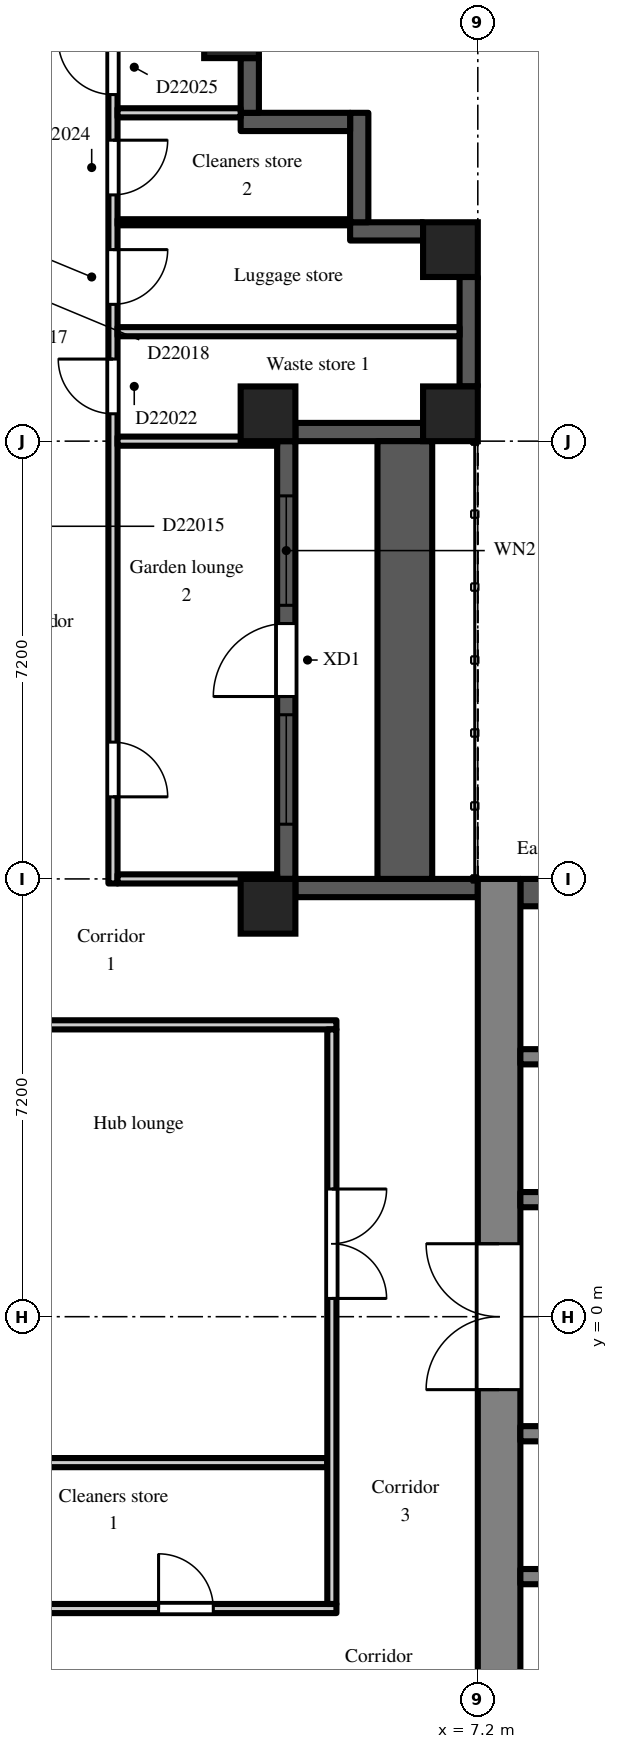
"""IFC4 building model, lengths in metres.
Left out: names, types, materials, properties, quantities, classifications, styles, units other than length and angle.
Written with IfcOpenShell. Run it as: python <this file> out.ifc"""

import sys

from ifc_helpers import new_model, si_unit, direction, frame, frame_2d, origin, origin_2d, place, context, subcontext, project, spatial, rectangle, extrude, element, fill, save


model = new_model("IFC4")
c1 = context("Model", 3, precision=1e-05, world=origin(), true_north=direction((0.0, 1.0)))
c2 = subcontext(c1, "Body", "Model", "MODEL_VIEW")
j1 = project(units=[si_unit("LENGTHUNIT", "METRE"), si_unit("PLANEANGLEUNIT", "RADIAN")], contexts=[c1])
p1 = place(None, origin())
s1 = spatial("IfcSite", under=j1, at=p1, CompositionType="ELEMENT")
p2 = place(p1, origin())
s2 = spatial("IfcBuilding", under=s1, at=p2, CompositionType="ELEMENT")
p3 = place(p2, frame((0.0, 0.0, 159.3)))
s3 = spatial("IfcBuildingStorey", under=s2, at=p3, CompositionType="ELEMENT", Elevation=159.3)
for number, where, z_axis, x_axis in (
    (1, (3.15, 21.15, 0.0), (0.0, 0.0, 1.0), (1.0, 0.0, 0.0)),
    (2, (3.75, 6.75, 0.0), (0.0, 0.0, 1.0), (1.0, 0.0, 0.0)),
    (3, (3.75, 14.85, 0.0), (0.0, 0.0, 1.0), (1.0, 0.0, 0.0)),
    (4, (6.75, 14.85, 0.0), (0.0, 0.0, 1.0), (1.0, 0.0, 0.0)),
    (5, (6.75, 17.55, 0.0), (0.0, 0.0, 1.0), (1.0, 0.0, 0.0)),
):
    element("IfcColumn", number, at=place(p3, frame(where, z_axis=z_axis, x_axis=x_axis)), inside=s3, PredefinedType="COLUMN", context=c2, shape_type="SweptSolid", body=[
        extrude(rectangle(XDim=0.9, YDim=0.9, at=origin_2d()), origin(), (0.0, 0.0, 1.0), 3.0),
    ])
p4 = place(p3, frame((7.2, 7.05, 0.0), z_axis=(0.0, 0.0, 1.0), x_axis=(-1.0, 0.0, 0.0)))
e6 = element("IfcWall", 6, at=p4, inside=s3, PredefinedType="SOLIDWALL", context=c2, shape_type="SweptSolid", body=[
    extrude(rectangle(XDim=3.0, YDim=0.3, at=frame_2d((1.5, 0.0))), origin(), (0.0, 0.0, 1.0), 2.55),
])
p5 = place(p3, frame((4.05, 7.2, 0.0), z_axis=(0.0, 0.0, 1.0), x_axis=(0.0, 1.0, 0.0)))
e7 = element("IfcWall", 7, at=p5, inside=s3, PredefinedType="SOLIDWALL", context=c2, shape_type="SweptSolid", body=[
    extrude(rectangle(XDim=7.2, YDim=0.3, at=frame_2d((3.6, 0.0))), origin(), (0.0, 0.0, 1.0), 2.55),
])
p6 = place(p5, frame((3.0, 0.0, 0.0)))
e8 = element("IfcOpeningElement", 8, at=p6, cuts=e7, PredefinedType="OPENING", context=c2, shape_type="SweptSolid", body=[
    extrude(rectangle(XDim=1.2, YDim=2.05, at=frame_2d((0.6, 1.025))), frame((0.0, 0.16, 0.0), z_axis=(0.0, -1.0, 0.0), x_axis=(1.0, 0.0, 0.0)), (0.0, 0.0, 1.0), 0.32),
])
p7 = place(p5, frame((0.9, 0.0, 0.2)))
e9 = element("IfcOpeningElement", 9, at=p7, cuts=e7, PredefinedType="OPENING", context=c2, shape_type="SweptSolid", body=[
    extrude(rectangle(XDim=1.8, YDim=1.85, at=frame_2d((0.9, 0.925))), frame((0.0, 0.16, 0.0), z_axis=(0.0, -1.0, 0.0), x_axis=(1.0, 0.0, 0.0)), (0.0, 0.0, 1.0), 0.32),
])
p8 = place(p5, frame((4.5, 0.0, 0.2)))
e10 = element("IfcOpeningElement", 10, at=p8, cuts=e7, PredefinedType="OPENING", context=c2, shape_type="SweptSolid", body=[
    extrude(rectangle(XDim=1.8, YDim=1.85, at=frame_2d((0.9, 0.925))), frame((0.0, 0.16, 0.0), z_axis=(0.0, -1.0, 0.0), x_axis=(1.0, 0.0, 0.0)), (0.0, 0.0, 1.0), 0.32),
])
p9 = place(p3, frame((4.2, 14.55, 0.0), z_axis=(0.0, 0.0, 1.0), x_axis=(1.0, 0.0, 0.0)))
e11 = element("IfcWall", 11, at=p9, inside=s3, PredefinedType="SOLIDWALL", context=c2, shape_type="SweptSolid", body=[
    extrude(rectangle(XDim=2.1, YDim=0.3, at=frame_2d((1.05, 0.0))), origin(), (0.0, 0.0, 1.0), 2.55),
])
p10 = place(p3, frame((7.05, 15.3, 0.0), z_axis=(0.0, 0.0, 1.0), x_axis=(0.0, 1.0, 0.0)))
e12 = element("IfcWall", 12, at=p10, inside=s3, PredefinedType="SOLIDWALL", context=c2, shape_type="SweptSolid", body=[
    extrude(rectangle(XDim=1.8, YDim=0.3, at=frame_2d((0.9, 0.0))), origin(), (0.0, 0.0, 1.0), 2.2),
])
p11 = place(p3, frame((6.3, 17.85, 0.0), z_axis=(0.0, 0.0, 1.0), x_axis=(-1.0, 0.0, 0.0)))
e13 = element("IfcWall", 13, at=p11, inside=s3, PredefinedType="SOLIDWALL", context=c2, shape_type="SweptSolid", body=[
    extrude(rectangle(XDim=1.2, YDim=0.3, at=frame_2d((0.6, 0.0))), origin(), (0.0, 0.0, 1.0), 2.55),
])
for number, where, z_axis, x_axis in (
    (14, (5.25, 18.0, 0.0), (0.0, 0.0, 1.0), (0.0, 1.0, 0.0)),
    (15, (5.1, 19.65, 0.0), (0.0, 0.0, 1.0), (-1.0, 0.0, 0.0)),
):
    element("IfcWall", number, at=place(p3, frame(where, z_axis=z_axis, x_axis=x_axis)), inside=s3, PredefinedType="SOLIDWALL", context=c2, shape_type="SweptSolid", body=[
        extrude(rectangle(XDim=1.8, YDim=0.3, at=frame_2d((0.9, 0.0))), origin(), (0.0, 0.0, 1.0), 2.55),
    ])
p12 = place(p3, frame((3.45, 19.8, 0.0), z_axis=(0.0, 0.0, 1.0), x_axis=(0.0, 1.0, 0.0)))
e16 = element("IfcWall", 16, at=p12, inside=s3, PredefinedType="SOLIDWALL", context=c2, shape_type="SweptSolid", body=[
    extrude(rectangle(XDim=0.9, YDim=0.3, at=frame_2d((0.45, 0.0))), origin(), (0.0, 0.0, 1.0), 2.55),
])
p13 = place(p3, frame((6.0, 7.2, 0.0), z_axis=(0.0, 0.0, 1.0), x_axis=(0.0, 1.0, 0.0)))
e17 = element("IfcWall", 17, at=p13, inside=s3, PredefinedType="PARAPET", context=c2, shape_type="SweptSolid", body=[
    extrude(rectangle(XDim=7.2, YDim=0.9, at=frame_2d((3.6, 0.0))), origin(), (0.0, 0.0, 1.0), 0.8),
])
p14 = place(p3, frame((7.55, -7.2, 0.0), z_axis=(0.0, 0.0, 1.0), x_axis=(0.0, 1.0, 0.0)))
e18 = element("IfcWall", 18, at=p14, inside=s3, PredefinedType="SHEAR", context=c2, shape_type="SweptSolid", body=[
    extrude(rectangle(XDim=14.4, YDim=0.7, at=frame_2d((7.2, 0.0))), origin(), (0.0, 0.0, 1.0), 2.55),
])
p15 = place(p14, frame((6.0, 0.0, 0.0)))
e19 = element("IfcOpeningElement", 19, at=p15, cuts=e18, PredefinedType="OPENING", context=c2, shape_type="SweptSolid", body=[
    extrude(rectangle(XDim=2.4, YDim=2.2, at=frame_2d((1.2, 1.1))), frame((0.0, 0.36, 0.0), z_axis=(0.0, -1.0, 0.0), x_axis=(1.0, 0.0, 0.0)), (0.0, 0.0, 1.0), 0.72),
])
p16 = place(p3, frame((7.9, 6.975, 0.0), z_axis=(0.0, 0.0, 1.0), x_axis=(1.0, 0.0, 0.0)))
e20 = element("IfcWall", 20, at=p16, inside=s3, PredefinedType="SHEAR", context=c2, shape_type="SweptSolid", body=[
    extrude(rectangle(XDim=12.95, YDim=0.45, at=frame_2d((6.475, 0.0))), origin(), (0.0, 0.0, 1.0), 2.55),
])
p17 = place(p3, frame((7.9, 1.925, 0.0), z_axis=(0.0, 0.0, 1.0), x_axis=(1.0, 0.0, 0.0)))
e21 = element("IfcWall", 21, at=p17, inside=s3, PredefinedType="SHEAR", context=c2, shape_type="SweptSolid", body=[
    extrude(rectangle(XDim=12.95, YDim=0.25, at=frame_2d((6.475, 0.0))), origin(), (0.0, 0.0, 1.0), 2.55),
])
p18 = place(p17, frame((4.825, 0.0, 0.0)))
e22 = element("IfcOpeningElement", 22, at=p18, cuts=e21, PredefinedType="OPENING", context=c2, shape_type="SweptSolid", body=[
    extrude(rectangle(XDim=1.1, YDim=2.1, at=frame_2d((0.55, 1.05))), frame((0.0, 0.135, 0.0), z_axis=(0.0, -1.0, 0.0), x_axis=(1.0, 0.0, 0.0)), (0.0, 0.0, 1.0), 0.27),
])
p19 = place(p17, frame((7.025, 0.0, 0.0)))
e23 = element("IfcOpeningElement", 23, at=p19, cuts=e21, PredefinedType="OPENING", context=c2, shape_type="SweptSolid", body=[
    extrude(rectangle(XDim=1.1, YDim=2.1, at=frame_2d((0.55, 1.05))), frame((0.0, 0.135, 0.0), z_axis=(0.0, -1.0, 0.0), x_axis=(1.0, 0.0, 0.0)), (0.0, 0.0, 1.0), 0.27),
])
p20 = place(p17, frame((9.225, 0.0, 0.0)))
e24 = element("IfcOpeningElement", 24, at=p20, cuts=e21, PredefinedType="OPENING", context=c2, shape_type="SweptSolid", body=[
    extrude(rectangle(XDim=1.1, YDim=2.1, at=frame_2d((0.55, 1.05))), frame((0.0, 0.135, 0.0), z_axis=(0.0, -1.0, 0.0), x_axis=(1.0, 0.0, 0.0)), (0.0, 0.0, 1.0), 0.27),
])
p21 = place(p17, frame((0.525, 0.0, 0.0)))
e25 = element("IfcOpeningElement", 25, at=p21, cuts=e21, PredefinedType="OPENING", context=c2, shape_type="SweptSolid", body=[
    extrude(rectangle(XDim=0.9, YDim=2.1, at=frame_2d((0.45, 1.05))), frame((0.0, 0.135, 0.0), z_axis=(0.0, -1.0, 0.0), x_axis=(1.0, 0.0, 0.0)), (0.0, 0.0, 1.0), 0.27),
])
p22 = place(p17, frame((2.625, 0.0, 0.0)))
e26 = element("IfcOpeningElement", 26, at=p22, cuts=e21, PredefinedType="OPENING", context=c2, shape_type="SweptSolid", body=[
    extrude(rectangle(XDim=1.1, YDim=2.1, at=frame_2d((0.55, 1.05))), frame((0.0, 0.135, 0.0), z_axis=(0.0, -1.0, 0.0), x_axis=(1.0, 0.0, 0.0)), (0.0, 0.0, 1.0), 0.27),
])
p23 = place(p17, frame((11.525, 0.0, 0.0)))
e27 = element("IfcOpeningElement", 27, at=p23, cuts=e21, PredefinedType="OPENING", context=c2, shape_type="SweptSolid", body=[
    extrude(rectangle(XDim=0.9, YDim=2.1, at=frame_2d((0.45, 1.05))), frame((0.0, 0.135, 0.0), z_axis=(0.0, -1.0, 0.0), x_axis=(1.0, 0.0, 0.0)), (0.0, 0.0, 1.0), 0.27),
])
p24 = place(p3, frame((7.9, 4.275, 0.0), z_axis=(0.0, 0.0, 1.0), x_axis=(1.0, 0.0, 0.0)))
e28 = element("IfcWall", 28, at=p24, inside=s3, PredefinedType="SHEAR", context=c2, shape_type="SweptSolid", body=[
    extrude(rectangle(XDim=1.95, YDim=0.25, at=frame_2d((0.975, 0.0))), origin(), (0.0, 0.0, 1.0), 2.55),
])
p25 = place(p3, frame((7.9, -1.925, 0.0), z_axis=(0.0, 0.0, 1.0), x_axis=(1.0, 0.0, 0.0)))
e29 = element("IfcWall", 29, at=p25, inside=s3, PredefinedType="SHEAR", context=c2, shape_type="SweptSolid", body=[
    extrude(rectangle(XDim=12.95, YDim=0.25, at=frame_2d((6.475, 0.0))), origin(), (0.0, 0.0, 1.0), 2.55),
])
p26 = place(p25, frame((0.525, 0.0, 0.0)))
e30 = element("IfcOpeningElement", 30, at=p26, cuts=e29, PredefinedType="OPENING", context=c2, shape_type="SweptSolid", body=[
    extrude(rectangle(XDim=0.9, YDim=2.1, at=frame_2d((0.45, 1.05))), frame((0.0, 0.135, 0.0), z_axis=(0.0, -1.0, 0.0), x_axis=(1.0, 0.0, 0.0)), (0.0, 0.0, 1.0), 0.27),
])
p27 = place(p25, frame((2.625, 0.0, 0.0)))
e31 = element("IfcOpeningElement", 31, at=p27, cuts=e29, PredefinedType="OPENING", context=c2, shape_type="SweptSolid", body=[
    extrude(rectangle(XDim=1.1, YDim=2.1, at=frame_2d((0.55, 1.05))), frame((0.0, 0.135, 0.0), z_axis=(0.0, -1.0, 0.0), x_axis=(1.0, 0.0, 0.0)), (0.0, 0.0, 1.0), 0.27),
])
p28 = place(p25, frame((8.225, 0.0, 0.0)))
e32 = element("IfcOpeningElement", 32, at=p28, cuts=e29, PredefinedType="OPENING", context=c2, shape_type="SweptSolid", body=[
    extrude(rectangle(XDim=0.9, YDim=2.1, at=frame_2d((0.45, 1.05))), frame((0.0, 0.135, 0.0), z_axis=(0.0, -1.0, 0.0), x_axis=(1.0, 0.0, 0.0)), (0.0, 0.0, 1.0), 0.27),
])
p29 = place(p3, frame((7.9, -4.275, 0.0), z_axis=(0.0, 0.0, 1.0), x_axis=(1.0, 0.0, 0.0)))
e33 = element("IfcWall", 33, at=p29, inside=s3, PredefinedType="SHEAR", context=c2, shape_type="SweptSolid", body=[
    extrude(rectangle(XDim=1.95, YDim=0.25, at=frame_2d((0.975, 0.0))), origin(), (0.0, 0.0, 1.0), 2.55),
])
p30 = place(p3, frame((-4.725, -4.8, 0.0), z_axis=(0.0, 0.0, 1.0), x_axis=(1.0, 0.0, 0.0)))
e34 = element("IfcWall", 34, at=p30, inside=s3, PredefinedType="PARTITIONING", context=c2, shape_type="SweptSolid", body=[
    extrude(rectangle(XDim=9.6, YDim=0.15, at=frame_2d((4.8, 0.0))), origin(), (0.0, 0.0, 1.0), 2.55),
])
p31 = place(p30, frame((0.675, 0.0, 0.0)))
e35 = element("IfcOpeningElement", 35, at=p31, cuts=e34, PredefinedType="OPENING", context=c2, shape_type="SweptSolid", body=[
    extrude(rectangle(XDim=0.9, YDim=2.1, at=frame_2d((0.45, 1.05))), frame((0.0, 0.085, 0.0), z_axis=(0.0, -1.0, 0.0), x_axis=(1.0, 0.0, 0.0)), (0.0, 0.0, 1.0), 0.17),
])
p32 = place(p30, frame((3.075, 0.0, 0.0)))
e36 = element("IfcOpeningElement", 36, at=p32, cuts=e34, PredefinedType="OPENING", context=c2, shape_type="SweptSolid", body=[
    extrude(rectangle(XDim=0.9, YDim=2.1, at=frame_2d((0.45, 1.05))), frame((0.0, 0.085, 0.0), z_axis=(0.0, -1.0, 0.0), x_axis=(1.0, 0.0, 0.0)), (0.0, 0.0, 1.0), 0.17),
])
p33 = place(p30, frame((6.675, 0.0, 0.0)))
e37 = element("IfcOpeningElement", 37, at=p33, cuts=e34, PredefinedType="OPENING", context=c2, shape_type="SweptSolid", body=[
    extrude(rectangle(XDim=0.9, YDim=2.1, at=frame_2d((0.45, 1.05))), frame((0.0, 0.085, 0.0), z_axis=(0.0, -1.0, 0.0), x_axis=(1.0, 0.0, 0.0)), (0.0, 0.0, 1.0), 0.17),
])
p34 = place(p3, frame((-4.725, 4.8, 0.0), z_axis=(0.0, 0.0, 1.0), x_axis=(1.0, 0.0, 0.0)))
e38 = element("IfcWall", 38, at=p34, inside=s3, PredefinedType="PARTITIONING", context=c2, shape_type="SweptSolid", body=[
    extrude(rectangle(XDim=9.6, YDim=0.15, at=frame_2d((4.8, 0.0))), origin(), (0.0, 0.0, 1.0), 2.55),
])
p35 = place(p3, frame((0.0, -2.4, 0.0), z_axis=(0.0, 0.0, 1.0), x_axis=(1.0, 0.0, 0.0)))
e39 = element("IfcWall", 39, at=p35, inside=s3, PredefinedType="PARTITIONING", context=c2, shape_type="SweptSolid", body=[
    extrude(rectangle(XDim=4.725, YDim=0.15, at=frame_2d((2.363, 0.0))), origin(), (0.0, 0.0, 1.0), 2.55),
])
p36 = place(p3, frame((1.2, 7.125, 0.0), z_axis=(0.0, 0.0, 1.0), x_axis=(0.0, 1.0, 0.0)))
e40 = element("IfcWall", 40, at=p36, inside=s3, PredefinedType="PARTITIONING", context=c2, shape_type="SweptSolid", body=[
    extrude(rectangle(XDim=14.175, YDim=0.15, at=frame_2d((7.087, 0.0))), origin(), (0.0, 0.0, 1.0), 2.55),
])
p37 = place(p36, frame((1.425, 0.0, 0.0)))
e41 = element("IfcOpeningElement", 41, at=p37, cuts=e40, PredefinedType="OPENING", context=c2, shape_type="SweptSolid", body=[
    extrude(rectangle(XDim=0.9, YDim=2.1, at=frame_2d((0.45, 1.05))), frame((0.0, 0.085, 0.0), z_axis=(0.0, -1.0, 0.0), x_axis=(1.0, 0.0, 0.0)), (0.0, 0.0, 1.0), 0.17),
])
p38 = place(p36, frame((7.725, 0.0, 0.0)))
e42 = element("IfcOpeningElement", 42, at=p38, cuts=e40, PredefinedType="OPENING", context=c2, shape_type="SweptSolid", body=[
    extrude(rectangle(XDim=0.9, YDim=2.1, at=frame_2d((0.45, 1.05))), frame((0.0, 0.085, 0.0), z_axis=(0.0, -1.0, 0.0), x_axis=(1.0, 0.0, 0.0)), (0.0, 0.0, 1.0), 0.17),
])
p39 = place(p36, frame((9.525, 0.0, 0.0)))
e43 = element("IfcOpeningElement", 43, at=p39, cuts=e40, PredefinedType="OPENING", context=c2, shape_type="SweptSolid", body=[
    extrude(rectangle(XDim=0.9, YDim=2.1, at=frame_2d((0.45, 1.05))), frame((0.0, 0.085, 0.0), z_axis=(0.0, -1.0, 0.0), x_axis=(1.0, 0.0, 0.0)), (0.0, 0.0, 1.0), 0.17),
])
p40 = place(p36, frame((11.325, 0.0, 0.0)))
e44 = element("IfcOpeningElement", 44, at=p40, cuts=e40, PredefinedType="OPENING", context=c2, shape_type="SweptSolid", body=[
    extrude(rectangle(XDim=0.9, YDim=2.1, at=frame_2d((0.45, 1.05))), frame((0.0, 0.085, 0.0), z_axis=(0.0, -1.0, 0.0), x_axis=(1.0, 0.0, 0.0)), (0.0, 0.0, 1.0), 0.17),
])
p41 = place(p36, frame((12.975, 0.0, 0.0)))
e45 = element("IfcOpeningElement", 45, at=p41, cuts=e40, PredefinedType="OPENING", context=c2, shape_type="SweptSolid", body=[
    extrude(rectangle(XDim=0.9, YDim=2.1, at=frame_2d((0.45, 1.05))), frame((0.0, 0.085, 0.0), z_axis=(0.0, -1.0, 0.0), x_axis=(1.0, 0.0, 0.0)), (0.0, 0.0, 1.0), 0.17),
])
for number, where, z_axis, x_axis in (
    (46, (1.275, 7.2, 0.0), (0.0, 0.0, 1.0), (1.0, 0.0, 0.0)),
    (47, (1.275, 14.4, 0.0), (0.0, 0.0, 1.0), (1.0, 0.0, 0.0)),
):
    element("IfcWall", number, at=place(p3, frame(where, z_axis=z_axis, x_axis=x_axis)), inside=s3, PredefinedType="PARTITIONING", context=c2, shape_type="SweptSolid", body=[
        extrude(rectangle(XDim=2.625, YDim=0.15, at=frame_2d((1.312, 0.0))), origin(), (0.0, 0.0, 1.0), 2.55),
    ])
p42 = place(p3, frame((1.275, 16.2, 0.0), z_axis=(0.0, 0.0, 1.0), x_axis=(1.0, 0.0, 0.0)))
e48 = element("IfcWall", 48, at=p42, inside=s3, PredefinedType="PARTITIONING", context=c2, shape_type="SweptSolid", body=[
    extrude(rectangle(XDim=5.625, YDim=0.15, at=frame_2d((2.812, 0.0))), origin(), (0.0, 0.0, 1.0), 2.55),
])
p43 = place(p3, frame((1.275, 18.0, 0.0), z_axis=(0.0, 0.0, 1.0), x_axis=(1.0, 0.0, 0.0)))
e49 = element("IfcWall", 49, at=p43, inside=s3, PredefinedType="PARTITIONING", context=c2, shape_type="SweptSolid", body=[
    extrude(rectangle(XDim=3.825, YDim=0.1, at=frame_2d((1.913, 0.0))), origin(), (0.0, 0.0, 1.0), 2.55),
])
p44 = place(p3, frame((1.275, 19.8, 0.0), z_axis=(0.0, 0.0, 1.0), x_axis=(1.0, 0.0, 0.0)))
e50 = element("IfcWall", 50, at=p44, inside=s3, PredefinedType="PARTITIONING", context=c2, shape_type="SweptSolid", body=[
    extrude(rectangle(XDim=2.025, YDim=0.15, at=frame_2d((1.013, 0.0))), origin(), (0.0, 0.0, 1.0), 2.55),
])
p45 = place(p3, frame((4.8, -4.725, 0.0), z_axis=(0.0, 0.0, 1.0), x_axis=(0.0, 1.0, 0.0)))
e51 = element("IfcWall", 51, at=p45, inside=s3, PredefinedType="PARTITIONING", context=c2, shape_type="SweptSolid", body=[
    extrude(rectangle(XDim=9.45, YDim=0.15, at=frame_2d((4.725, 0.0))), origin(), (0.0, 0.0, 1.0), 2.55),
])
p46 = place(p45, frame((5.025, 0.0, 0.0)))
e52 = element("IfcOpeningElement", 52, at=p46, cuts=e51, PredefinedType="OPENING", context=c2, shape_type="SweptSolid", body=[
    extrude(rectangle(XDim=1.8, YDim=2.1, at=frame_2d((0.9, 1.05))), frame((0.0, 0.085, 0.0), z_axis=(0.0, -1.0, 0.0), x_axis=(1.0, 0.0, 0.0)), (0.0, 0.0, 1.0), 0.17),
])
p47 = place(p6, origin())
e53 = element("IfcDoor", 53, at=p47, inside=s3, OperationType="SINGLE_SWING_LEFT", PredefinedType="DOOR", context=c2, shape_type="SweptSolid", body=[
    extrude(rectangle(XDim=1.2, YDim=2.05, at=frame_2d((0.6, 1.025))), frame((0.0, 0.025, 0.0), z_axis=(0.0, -1.0, 0.0), x_axis=(1.0, 0.0, 0.0)), (0.0, 0.0, 1.0), 0.05),
])
fill(e8, e53)
p48 = place(p7, origin())
e54 = element("IfcWindow", 54, at=p48, inside=s3, PartitioningType="SINGLE_PANEL", PredefinedType="WINDOW", context=c2, shape_type="SweptSolid", body=[
    extrude(rectangle(XDim=1.8, YDim=1.85, at=frame_2d((0.9, 0.925))), frame((0.0, 0.03, 0.0), z_axis=(0.0, -1.0, 0.0), x_axis=(1.0, 0.0, 0.0)), (0.0, 0.0, 1.0), 0.06),
])
fill(e9, e54)
p49 = place(p8, origin())
e55 = element("IfcWindow", 55, at=p49, inside=s3, PartitioningType="SINGLE_PANEL", PredefinedType="WINDOW", context=c2, shape_type="SweptSolid", body=[
    extrude(rectangle(XDim=1.8, YDim=1.85, at=frame_2d((0.9, 0.925))), frame((0.0, 0.03, 0.0), z_axis=(0.0, -1.0, 0.0), x_axis=(1.0, 0.0, 0.0)), (0.0, 0.0, 1.0), 0.06),
])
fill(e10, e55)
p50 = place(p15, origin())
e56 = element("IfcDoor", 56, at=p50, inside=s3, OperationType="DOUBLE_DOOR_DOUBLE_SWING", PredefinedType="DOOR", context=c2, shape_type="SweptSolid", body=[
    extrude(rectangle(XDim=2.4, YDim=2.2, at=frame_2d((1.2, 1.1))), frame((0.0, 0.025, 0.0), z_axis=(0.0, -1.0, 0.0), x_axis=(1.0, 0.0, 0.0)), (0.0, 0.0, 1.0), 0.05),
])
fill(e19, e56)
p51 = place(p33, origin())
e57 = element("IfcDoor", 57, at=p51, inside=s3, OperationType="SINGLE_SWING_LEFT", PredefinedType="DOOR", context=c2, shape_type="SweptSolid", body=[
    extrude(rectangle(XDim=0.9, YDim=2.1, at=frame_2d((0.45, 1.05))), frame((0.0, 0.025, 0.0), z_axis=(0.0, -1.0, 0.0), x_axis=(1.0, 0.0, 0.0)), (0.0, 0.0, 1.0), 0.05),
])
fill(e37, e57)
p52 = place(p46, frame((1.8, 0.0, 0.0), z_axis=(0.0, 0.0, 1.0), x_axis=(-1.0, 0.0, 0.0)))
e58 = element("IfcDoor", 58, at=p52, inside=s3, OperationType="DOUBLE_DOOR_DOUBLE_SWING", PredefinedType="DOOR", context=c2, shape_type="SweptSolid", body=[
    extrude(rectangle(XDim=1.8, YDim=2.1, at=frame_2d((0.9, 1.05))), frame((0.0, 0.025, 0.0), z_axis=(0.0, -1.0, 0.0), x_axis=(1.0, 0.0, 0.0)), (0.0, 0.0, 1.0), 0.05),
])
fill(e52, e58)
p53 = place(p37, frame((0.9, 0.0, 0.0), z_axis=(0.0, 0.0, 1.0), x_axis=(-1.0, 0.0, 0.0)))
e59 = element("IfcDoor", 59, at=p53, inside=s3, OperationType="SINGLE_SWING_RIGHT", PredefinedType="DOOR", context=c2, shape_type="SweptSolid", body=[
    extrude(rectangle(XDim=0.9, YDim=2.1, at=frame_2d((0.45, 1.05))), frame((0.0, 0.025, 0.0), z_axis=(0.0, -1.0, 0.0), x_axis=(1.0, 0.0, 0.0)), (0.0, 0.0, 1.0), 0.05),
])
fill(e41, e59)
p54 = place(p38, origin())
e60 = element("IfcDoor", 60, at=p54, inside=s3, OperationType="SINGLE_SWING_RIGHT", PredefinedType="DOOR", context=c2, shape_type="SweptSolid", body=[
    extrude(rectangle(XDim=0.9, YDim=2.1, at=frame_2d((0.45, 1.05))), frame((0.0, 0.025, 0.0), z_axis=(0.0, -1.0, 0.0), x_axis=(1.0, 0.0, 0.0)), (0.0, 0.0, 1.0), 0.05),
])
fill(e42, e60)
p55 = place(p39, frame((0.9, 0.0, 0.0), z_axis=(0.0, 0.0, 1.0), x_axis=(-1.0, 0.0, 0.0)))
e61 = element("IfcDoor", 61, at=p55, inside=s3, OperationType="SINGLE_SWING_LEFT", PredefinedType="DOOR", context=c2, shape_type="SweptSolid", body=[
    extrude(rectangle(XDim=0.9, YDim=2.1, at=frame_2d((0.45, 1.05))), frame((0.0, 0.025, 0.0), z_axis=(0.0, -1.0, 0.0), x_axis=(1.0, 0.0, 0.0)), (0.0, 0.0, 1.0), 0.05),
])
fill(e43, e61)
p56 = place(p40, frame((0.9, 0.0, 0.0), z_axis=(0.0, 0.0, 1.0), x_axis=(-1.0, 0.0, 0.0)))
e62 = element("IfcDoor", 62, at=p56, inside=s3, OperationType="SINGLE_SWING_LEFT", PredefinedType="DOOR", context=c2, shape_type="SweptSolid", body=[
    extrude(rectangle(XDim=0.9, YDim=2.1, at=frame_2d((0.45, 1.05))), frame((0.0, 0.025, 0.0), z_axis=(0.0, -1.0, 0.0), x_axis=(1.0, 0.0, 0.0)), (0.0, 0.0, 1.0), 0.05),
])
fill(e44, e62)
p57 = place(p41, origin())
e63 = element("IfcDoor", 63, at=p57, inside=s3, OperationType="SINGLE_SWING_RIGHT", PredefinedType="DOOR", context=c2, shape_type="SweptSolid", body=[
    extrude(rectangle(XDim=0.9, YDim=2.1, at=frame_2d((0.45, 1.05))), frame((0.0, 0.025, 0.0), z_axis=(0.0, -1.0, 0.0), x_axis=(1.0, 0.0, 0.0)), (0.0, 0.0, 1.0), 0.05),
])
fill(e45, e63)
save(model, sys.argv[1])
